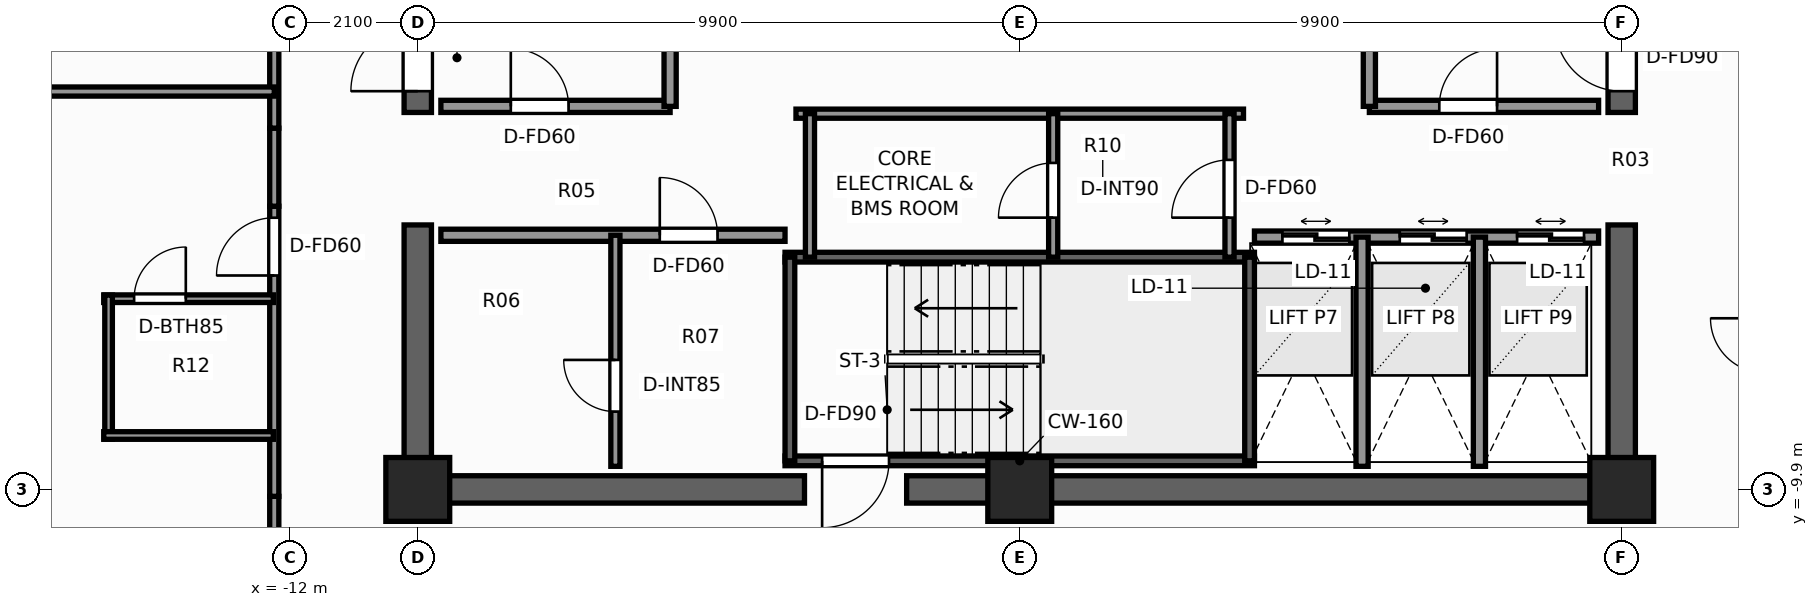
"""IFC4 building model, lengths in metres.
Left out: names, types, materials, properties, quantities, classifications, styles, units other than length and angle.
Written with IfcOpenShell. Run it as: python <this file> out.ifc"""

import sys

from ifc_helpers import new_model, si_unit, direction, frame, frame_2d, origin, origin_2d, place, context, subcontext, project, spatial, rectangle, extrude, element, fill, save


model = new_model("IFC4")
c1 = context("Model", 3, precision=1e-05, world=origin(), true_north=direction((0.0, 1.0)))
c2 = subcontext(c1, "Body", "Model", "MODEL_VIEW")
j1 = project(units=[si_unit("LENGTHUNIT", "METRE"), si_unit("PLANEANGLEUNIT", "RADIAN")], contexts=[c1])
p1 = place(None, origin())
s1 = spatial("IfcSite", under=j1, at=p1, CompositionType="ELEMENT")
p2 = place(p1, origin())
s2 = spatial("IfcBuilding", under=s1, at=p2, CompositionType="ELEMENT")
p3 = place(p2, frame((0.0, 0.0, 219.6)))
s3 = spatial("IfcBuildingStorey", under=s2, at=p3, CompositionType="ELEMENT", Elevation=219.6)
p4 = place(p3, frame((10.125, -9.9, 0.0), z_axis=(0.0, 0.0, 1.0), x_axis=(-1.0, 0.0, 0.0)))
e1 = element("IfcWall", 1, at=p4, inside=s3, PredefinedType="SHEAR", context=c2, shape_type="SweptSolid", body=[
    extrude(rectangle(XDim=11.985, YDim=0.45, at=frame_2d((5.993, 0.0))), origin(), (0.0, 0.0, 1.0), 3.3),
])
p5 = place(p3, frame((-3.54, -9.9, 0.0), z_axis=(0.0, 0.0, 1.0), x_axis=(-1.0, 0.0, 0.0)))
e2 = element("IfcWall", 2, at=p5, inside=s3, PredefinedType="SHEAR", context=c2, shape_type="SweptSolid", body=[
    extrude(rectangle(XDim=6.585, YDim=0.45, at=frame_2d((3.292, 0.0))), origin(), (0.0, 0.0, 1.0), 3.3),
])
for number, where, z_axis, x_axis in (
    (3, (-9.9, -9.675, 0.0), (0.0, 0.0, 1.0), (0.0, 1.0, 0.0)),
    (4, (9.9, -9.675, 0.0), (0.0, 0.0, 1.0), (0.0, 1.0, 0.0)),
):
    element("IfcWall", number, at=place(p3, frame(where, z_axis=z_axis, x_axis=x_axis)), inside=s3, PredefinedType="SHEAR", context=c2, shape_type="SweptSolid", body=[
        extrude(rectangle(XDim=4.125, YDim=0.45, at=frame_2d((2.062, 0.0))), origin(), (0.0, 0.0, 1.0), 3.3),
    ])
p6 = place(p3, frame((-9.9, -3.7, 0.0), z_axis=(0.0, 0.0, 1.0), x_axis=(0.0, 1.0, 0.0)))
e5 = element("IfcWall", 5, at=p6, inside=s3, PredefinedType="SHEAR", context=c2, shape_type="SweptSolid", body=[
    extrude(rectangle(XDim=13.375, YDim=0.45, at=frame_2d((6.688, 0.0))), origin(), (0.0, 0.0, 1.0), 3.3),
])
p7 = place(p6, frame((0.35, 0.0, 0.0)))
e6 = element("IfcOpeningElement", 6, at=p7, cuts=e5, PredefinedType="OPENING", context=c2, shape_type="SweptSolid", body=[
    extrude(rectangle(XDim=1.1, YDim=2.2, at=frame_2d((0.55, 1.1))), frame((0.0, 0.235, 0.0), z_axis=(0.0, -1.0, 0.0), x_axis=(1.0, 0.0, 0.0)), (0.0, 0.0, 1.0), 0.47),
])
p8 = place(p3, frame((9.9, -3.7, 0.0), z_axis=(0.0, 0.0, 1.0), x_axis=(0.0, 1.0, 0.0)))
e7 = element("IfcWall", 7, at=p8, inside=s3, PredefinedType="SHEAR", context=c2, shape_type="SweptSolid", body=[
    extrude(rectangle(XDim=13.375, YDim=0.45, at=frame_2d((6.688, 0.0))), origin(), (0.0, 0.0, 1.0), 3.3),
])
p9 = place(p8, frame((0.35, 0.0, 0.0)))
e8 = element("IfcOpeningElement", 8, at=p9, cuts=e7, PredefinedType="OPENING", context=c2, shape_type="SweptSolid", body=[
    extrude(rectangle(XDim=1.1, YDim=2.2, at=frame_2d((0.55, 1.1))), frame((0.0, 0.235, 0.0), z_axis=(0.0, -1.0, 0.0), x_axis=(1.0, 0.0, 0.0)), (0.0, 0.0, 1.0), 0.47),
])
for number, where, z_axis, x_axis in (
    (9, (-9.9, -9.9, 0.0), (0.0, 0.0, 1.0), (1.0, 0.0, 0.0)),
    (10, (9.9, -9.9, 0.0), (0.0, 0.0, 1.0), (1.0, 0.0, 0.0)),
    (11, (0.0, -9.9, 0.0), (0.0, 0.0, 1.0), (1.0, 0.0, 0.0)),
):
    element("IfcColumn", number, at=place(p3, frame(where, z_axis=z_axis, x_axis=x_axis)), inside=s3, PredefinedType="COLUMN", context=c2, shape_type="SweptSolid", body=[
        extrude(rectangle(XDim=1.05, YDim=1.05, at=origin_2d()), origin(), (0.0, 0.0, 1.0), 3.3),
    ])
p10 = place(p3, frame((3.86, -9.43, 0.0), z_axis=(0.0, 0.0, 1.0), x_axis=(-1.0, 0.0, 0.0)))
e12 = element("IfcWall", 12, at=p10, inside=s3, PredefinedType="SHEAR", context=c2, shape_type="SweptSolid", body=[
    extrude(rectangle(XDim=7.72, YDim=0.16, at=frame_2d((3.86, 0.0))), origin(), (0.0, 0.0, 1.0), 3.3),
])
p11 = place(p10, frame((6.01, 0.0, 0.0)))
e13 = element("IfcOpeningElement", 13, at=p11, cuts=e12, PredefinedType="OPENING", context=c2, shape_type="SweptSolid", body=[
    extrude(rectangle(XDim=1.1, YDim=2.2, at=frame_2d((0.55, 1.1))), frame((0.0, 0.09, 0.0), z_axis=(0.0, -1.0, 0.0), x_axis=(1.0, 0.0, 0.0)), (0.0, 0.0, 1.0), 0.18),
])
p12 = place(p3, frame((-3.86, -6.08, 0.0), z_axis=(0.0, 0.0, 1.0), x_axis=(1.0, 0.0, 0.0)))
e14 = element("IfcWall", 14, at=p12, inside=s3, PredefinedType="SHEAR", context=c2, shape_type="SweptSolid", body=[
    extrude(rectangle(XDim=7.72, YDim=0.16, at=frame_2d((3.86, 0.0))), origin(), (0.0, 0.0, 1.0), 3.3),
])
for number, where, z_axis, x_axis in (
    (15, (-3.78, -9.43, 0.0), (0.0, 0.0, 1.0), (0.0, 1.0, 0.0)),
    (16, (3.78, -9.43, 0.0), (0.0, 0.0, 1.0), (0.0, 1.0, 0.0)),
):
    element("IfcWall", number, at=place(p3, frame(where, z_axis=z_axis, x_axis=x_axis)), inside=s3, PredefinedType="SHEAR", context=c2, shape_type="SweptSolid", body=[
        extrude(rectangle(XDim=3.35, YDim=0.16, at=frame_2d((1.675, 0.0))), origin(), (0.0, 0.0, 1.0), 3.3),
    ])
p13 = place(p3, frame((-9.52, -3.6, 0.0), z_axis=(0.0, 0.0, 1.0), x_axis=(1.0, 0.0, 0.0)))
e17 = element("IfcWall", 17, at=p13, inside=s3, PredefinedType="SOLIDWALL", context=c2, shape_type="SweptSolid", body=[
    extrude(rectangle(XDim=3.77, YDim=0.2, at=frame_2d((1.885, 0.0))), origin(), (0.0, 0.0, 1.0), 3.08),
])
p14 = place(p13, frame((1.15, 0.0, 0.0)))
e18 = element("IfcOpeningElement", 18, at=p14, cuts=e17, PredefinedType="OPENING", context=c2, shape_type="SweptSolid", body=[
    extrude(rectangle(XDim=0.95, YDim=2.06, at=frame_2d((0.475, 1.03))), frame((0.0, 0.11, 0.0), z_axis=(0.0, -1.0, 0.0), x_axis=(1.0, 0.0, 0.0)), (0.0, 0.0, 1.0), 0.22),
])
p15 = place(p3, frame((-5.75, -3.6, 0.0), z_axis=(0.0, 0.0, 1.0), x_axis=(0.0, 1.0, 0.0)))
e19 = element("IfcWall", 19, at=p15, inside=s3, PredefinedType="SOLIDWALL", context=c2, shape_type="SweptSolid", body=[
    extrude(rectangle(XDim=5.57, YDim=0.2, at=frame_2d((2.785, 0.0))), origin(), (0.0, 0.0, 1.0), 3.08),
])
p16 = place(p15, frame((2.75, 0.0, 0.0)))
e20 = element("IfcOpeningElement", 20, at=p16, cuts=e19, PredefinedType="OPENING", context=c2, shape_type="SweptSolid", body=[
    extrude(rectangle(XDim=1.1, YDim=2.2, at=frame_2d((0.55, 1.1))), frame((0.0, 0.11, 0.0), z_axis=(0.0, -1.0, 0.0), x_axis=(1.0, 0.0, 0.0)), (0.0, 0.0, 1.0), 0.22),
])
p17 = place(p3, frame((5.75, -3.6, 0.0), z_axis=(0.0, 0.0, 1.0), x_axis=(1.0, 0.0, 0.0)))
e21 = element("IfcWall", 21, at=p17, inside=s3, PredefinedType="SOLIDWALL", context=c2, shape_type="SweptSolid", body=[
    extrude(rectangle(XDim=3.77, YDim=0.2, at=frame_2d((1.885, 0.0))), origin(), (0.0, 0.0, 1.0), 3.08),
])
p18 = place(p17, frame((1.15, 0.0, 0.0)))
e22 = element("IfcOpeningElement", 22, at=p18, cuts=e21, PredefinedType="OPENING", context=c2, shape_type="SweptSolid", body=[
    extrude(rectangle(XDim=0.95, YDim=2.06, at=frame_2d((0.475, 1.03))), frame((0.0, 0.11, 0.0), z_axis=(0.0, -1.0, 0.0), x_axis=(1.0, 0.0, 0.0)), (0.0, 0.0, 1.0), 0.22),
])
p19 = place(p3, frame((5.75, -3.6, 0.0), z_axis=(0.0, 0.0, 1.0), x_axis=(0.0, 1.0, 0.0)))
e23 = element("IfcWall", 23, at=p19, inside=s3, PredefinedType="SOLIDWALL", context=c2, shape_type="SweptSolid", body=[
    extrude(rectangle(XDim=5.57, YDim=0.2, at=frame_2d((2.785, 0.0))), origin(), (0.0, 0.0, 1.0), 3.08),
])
p20 = place(p19, frame((2.75, 0.0, 0.0)))
e24 = element("IfcOpeningElement", 24, at=p20, cuts=e23, PredefinedType="OPENING", context=c2, shape_type="SweptSolid", body=[
    extrude(rectangle(XDim=1.1, YDim=2.2, at=frame_2d((0.55, 1.1))), frame((0.0, 0.11, 0.0), z_axis=(0.0, -1.0, 0.0), x_axis=(1.0, 0.0, 0.0)), (0.0, 0.0, 1.0), 0.22),
])
p21 = place(p3, frame((-9.52, -5.72, 0.0), z_axis=(0.0, 0.0, 1.0), x_axis=(1.0, 0.0, 0.0)))
e25 = element("IfcWall", 25, at=p21, inside=s3, PredefinedType="SOLIDWALL", context=c2, shape_type="SweptSolid", body=[
    extrude(rectangle(XDim=5.66, YDim=0.2, at=frame_2d((2.83, 0.0))), origin(), (0.0, 0.0, 1.0), 3.08),
])
p22 = place(p21, frame((3.6, 0.0, 0.0)))
e26 = element("IfcOpeningElement", 26, at=p22, cuts=e25, PredefinedType="OPENING", context=c2, shape_type="SweptSolid", body=[
    extrude(rectangle(XDim=0.95, YDim=2.06, at=frame_2d((0.475, 1.03))), frame((0.0, 0.11, 0.0), z_axis=(0.0, -1.0, 0.0), x_axis=(1.0, 0.0, 0.0)), (0.0, 0.0, 1.0), 0.22),
])
p23 = place(p3, frame((-6.65, -9.52, 0.0), z_axis=(0.0, 0.0, 1.0), x_axis=(0.0, 1.0, 0.0)))
e27 = element("IfcWall", 27, at=p23, inside=s3, PredefinedType="PARTITIONING", context=c2, shape_type="SweptSolid", body=[
    extrude(rectangle(XDim=3.8, YDim=0.15, at=frame_2d((1.9, 0.0))), origin(), (0.0, 0.0, 1.0), 3.08),
])
p24 = place(p23, frame((0.9, 0.0, 0.0)))
e28 = element("IfcOpeningElement", 28, at=p24, cuts=e27, PredefinedType="OPENING", context=c2, shape_type="SweptSolid", body=[
    extrude(rectangle(XDim=0.85, YDim=2.03, at=frame_2d((0.425, 1.015))), frame((0.0, 0.085, 0.0), z_axis=(0.0, -1.0, 0.0), x_axis=(1.0, 0.0, 0.0)), (0.0, 0.0, 1.0), 0.17),
])
p25 = place(p3, frame((3.86, -5.75, 0.0), z_axis=(0.0, 0.0, 1.0), x_axis=(1.0, 0.0, 0.0)))
e29 = element("IfcWall", 29, at=p25, inside=s3, PredefinedType="SOLIDWALL", context=c2, shape_type="SweptSolid", body=[
    extrude(rectangle(XDim=5.66, YDim=0.2, at=frame_2d((2.83, 0.0))), origin(), (0.0, 0.0, 1.0), 3.08),
])
p26 = place(p25, frame((0.46, 0.0, 0.0)))
e30 = element("IfcOpeningElement", 30, at=p26, cuts=e29, PredefinedType="OPENING", context=c2, shape_type="SweptSolid", body=[
    extrude(rectangle(XDim=1.1, YDim=2.2, at=frame_2d((0.55, 1.1))), frame((0.0, 0.11, 0.0), z_axis=(0.0, -1.0, 0.0), x_axis=(1.0, 0.0, 0.0)), (0.0, 0.0, 1.0), 0.22),
])
p27 = place(p25, frame((2.39, 0.0, 0.0)))
e31 = element("IfcOpeningElement", 31, at=p27, cuts=e29, PredefinedType="OPENING", context=c2, shape_type="SweptSolid", body=[
    extrude(rectangle(XDim=1.1, YDim=2.2, at=frame_2d((0.55, 1.1))), frame((0.0, 0.11, 0.0), z_axis=(0.0, -1.0, 0.0), x_axis=(1.0, 0.0, 0.0)), (0.0, 0.0, 1.0), 0.22),
])
p28 = place(p25, frame((4.32, 0.0, 0.0)))
e32 = element("IfcOpeningElement", 32, at=p28, cuts=e29, PredefinedType="OPENING", context=c2, shape_type="SweptSolid", body=[
    extrude(rectangle(XDim=1.1, YDim=2.2, at=frame_2d((0.55, 1.1))), frame((0.0, 0.11, 0.0), z_axis=(0.0, -1.0, 0.0), x_axis=(1.0, 0.0, 0.0)), (0.0, 0.0, 1.0), 0.22),
])
for number, where, z_axis, x_axis in (
    (33, (5.63, -9.52, 0.0), (0.0, 0.0, 1.0), (0.0, 1.0, 0.0)),
    (34, (7.56, -9.52, 0.0), (0.0, 0.0, 1.0), (0.0, 1.0, 0.0)),
):
    element("IfcWall", number, at=place(p3, frame(where, z_axis=z_axis, x_axis=x_axis)), inside=s3, PredefinedType="SOLIDWALL", context=c2, shape_type="SweptSolid", body=[
        extrude(rectangle(XDim=3.77, YDim=0.2, at=frame_2d((1.885, 0.0))), origin(), (0.0, 0.0, 1.0), 3.08),
    ])
p29 = place(p3, frame((-3.68, -3.72, 0.0), z_axis=(0.0, 0.0, 1.0), x_axis=(1.0, 0.0, 0.0)))
e35 = element("IfcWall", 35, at=p29, inside=s3, PredefinedType="PARTITIONING", context=c2, shape_type="SweptSolid", body=[
    extrude(rectangle(XDim=7.36, YDim=0.15, at=frame_2d((3.68, 0.0))), origin(), (0.0, 0.0, 1.0), 3.08),
])
p30 = place(p3, frame((3.45, -6.08, 0.0), z_axis=(0.0, 0.0, 1.0), x_axis=(0.0, 1.0, 0.0)))
e36 = element("IfcWall", 36, at=p30, inside=s3, PredefinedType="PARTITIONING", context=c2, shape_type="SweptSolid", body=[
    extrude(rectangle(XDim=2.36, YDim=0.15, at=frame_2d((1.18, 0.0))), origin(), (0.0, 0.0, 1.0), 3.08),
])
p31 = place(p30, frame((0.65, 0.0, 0.0)))
e37 = element("IfcOpeningElement", 37, at=p31, cuts=e36, PredefinedType="OPENING", context=c2, shape_type="SweptSolid", body=[
    extrude(rectangle(XDim=0.95, YDim=2.06, at=frame_2d((0.475, 1.03))), frame((0.0, 0.085, 0.0), z_axis=(0.0, -1.0, 0.0), x_axis=(1.0, 0.0, 0.0)), (0.0, 0.0, 1.0), 0.17),
])
p32 = place(p3, frame((-3.45, -6.08, 0.0), z_axis=(0.0, 0.0, 1.0), x_axis=(0.0, 1.0, 0.0)))
e38 = element("IfcWall", 38, at=p32, inside=s3, PredefinedType="PARTITIONING", context=c2, shape_type="SweptSolid", body=[
    extrude(rectangle(XDim=2.36, YDim=0.15, at=frame_2d((1.18, 0.0))), origin(), (0.0, 0.0, 1.0), 3.08),
])
p33 = place(p3, frame((0.55, -6.08, 0.0), z_axis=(0.0, 0.0, 1.0), x_axis=(0.0, 1.0, 0.0)))
e39 = element("IfcWall", 39, at=p33, inside=s3, PredefinedType="PARTITIONING", context=c2, shape_type="SweptSolid", body=[
    extrude(rectangle(XDim=2.36, YDim=0.15, at=frame_2d((1.18, 0.0))), origin(), (0.0, 0.0, 1.0), 3.08),
])
p34 = place(p33, frame((0.65, 0.0, 0.0)))
e40 = element("IfcOpeningElement", 40, at=p34, cuts=e39, PredefinedType="OPENING", context=c2, shape_type="SweptSolid", body=[
    extrude(rectangle(XDim=0.9, YDim=2.06, at=frame_2d((0.45, 1.03))), frame((0.0, 0.085, 0.0), z_axis=(0.0, -1.0, 0.0), x_axis=(1.0, 0.0, 0.0)), (0.0, 0.0, 1.0), 0.17),
])
p35 = place(p3, frame((-12.26, -11.43, 0.0), z_axis=(0.0, 0.0, 1.0), x_axis=(0.0, 1.0, 0.0)))
e41 = element("IfcWall", 41, at=p35, inside=s3, PredefinedType="PARTITIONING", context=c2, shape_type="SweptSolid", body=[
    extrude(rectangle(XDim=1.417, YDim=0.15, at=frame_2d((0.708, 0.0))), origin(), (0.0, 0.0, 1.0), 1.265),
])
p36 = place(p3, frame((-12.26, -10.014, 0.0), z_axis=(0.0, 0.0, 1.0), x_axis=(0.0, 1.0, 0.0)))
e42 = element("IfcWall", 42, at=p36, inside=s3, PredefinedType="PARTITIONING", context=c2, shape_type="SweptSolid", body=[
    extrude(rectangle(XDim=4.772, YDim=0.15, at=frame_2d((2.386, 0.0))), origin(), (0.0, 0.0, 1.0), 3.08),
])
p37 = place(p36, frame((3.632, 0.0, 0.0)))
e43 = element("IfcOpeningElement", 43, at=p37, cuts=e42, PredefinedType="OPENING", context=c2, shape_type="SweptSolid", body=[
    extrude(rectangle(XDim=0.95, YDim=2.06, at=frame_2d((0.475, 1.03))), frame((0.0, 0.085, 0.0), z_axis=(0.0, -1.0, 0.0), x_axis=(1.0, 0.0, 0.0)), (0.0, 0.0, 1.0), 0.17),
])
p38 = place(p3, frame((-12.26, -5.242, 0.0), z_axis=(0.0, 0.0, 1.0), x_axis=(0.0, 1.0, 0.0)))
e44 = element("IfcWall", 44, at=p38, inside=s3, PredefinedType="PARTITIONING", context=c2, shape_type="SweptSolid", body=[
    extrude(rectangle(XDim=1.284, YDim=0.15, at=frame_2d((0.642, 0.0))), origin(), (0.0, 0.0, 1.0), 1.265),
])
p39 = place(p3, frame((-12.26, -3.958, 0.0), z_axis=(0.0, 0.0, 1.0), x_axis=(0.0, 1.0, 0.0)))
e45 = element("IfcWall", 45, at=p39, inside=s3, PredefinedType="PARTITIONING", context=c2, shape_type="SweptSolid", body=[
    extrude(rectangle(XDim=7.916, YDim=0.15, at=frame_2d((3.958, 0.0))), origin(), (0.0, 0.0, 1.0), 2.369),
])
p40 = place(p3, frame((-20.38, -3.356, 0.0), z_axis=(0.0, 0.0, 1.0), x_axis=(1.0, 0.0, 0.0)))
e46 = element("IfcWall", 46, at=p40, inside=s3, PredefinedType="PARTITIONING", context=c2, shape_type="SweptSolid", body=[
    extrude(rectangle(XDim=8.12, YDim=0.15, at=frame_2d((4.06, 0.0))), origin(), (0.0, 0.0, 1.0), 2.369),
])
p41 = place(p3, frame((-15.065, -6.763, 0.0), z_axis=(0.0, 0.0, 1.0), x_axis=(1.0, 0.0, 0.0)))
e47 = element("IfcWall", 47, at=p41, inside=s3, PredefinedType="PARTITIONING", context=c2, shape_type="SweptSolid", body=[
    extrude(rectangle(XDim=2.79, YDim=0.125, at=frame_2d((1.395, 0.0))), origin(), (0.0, 0.0, 1.0), 3.08),
])
p42 = place(p41, frame((0.5, 0.0, 0.0)))
e48 = element("IfcOpeningElement", 48, at=p42, cuts=e47, PredefinedType="OPENING", context=c2, shape_type="SweptSolid", body=[
    extrude(rectangle(XDim=0.85, YDim=2.03, at=frame_2d((0.425, 1.015))), frame((0.0, 0.073, 0.0), z_axis=(0.0, -1.0, 0.0), x_axis=(1.0, 0.0, 0.0)), (0.0, 0.0, 1.0), 0.145),
])
p43 = place(p3, frame((-14.985, -9.073, 0.0), z_axis=(0.0, 0.0, 1.0), x_axis=(0.0, 1.0, 0.0)))
e49 = element("IfcWall", 49, at=p43, inside=s3, PredefinedType="PARTITIONING", context=c2, shape_type="SweptSolid", body=[
    extrude(rectangle(XDim=2.37, YDim=0.125, at=frame_2d((1.185, 0.0))), origin(), (0.0, 0.0, 1.0), 3.08),
])
p44 = place(p3, frame((-15.065, -9.013, 0.0), z_axis=(0.0, 0.0, 1.0), x_axis=(1.0, 0.0, 0.0)))
e50 = element("IfcWall", 50, at=p44, inside=s3, PredefinedType="PARTITIONING", context=c2, shape_type="SweptSolid", body=[
    extrude(rectangle(XDim=2.79, YDim=0.125, at=frame_2d((1.395, 0.0))), origin(), (0.0, 0.0, 1.0), 3.08),
])
p45 = place(p11, origin())
e51 = element("IfcDoor", 51, at=p45, inside=s3, OperationType="SINGLE_SWING_RIGHT", PredefinedType="DOOR", context=c2, shape_type="SweptSolid", body=[
    extrude(rectangle(XDim=1.1, YDim=2.2, at=frame_2d((0.55, 1.1))), frame((0.0, 0.025, 0.0), z_axis=(0.0, -1.0, 0.0), x_axis=(1.0, 0.0, 0.0)), (0.0, 0.0, 1.0), 0.05),
])
fill(e13, e51)
p46 = place(p7, origin())
e52 = element("IfcDoor", 52, at=p46, inside=s3, OperationType="SINGLE_SWING_LEFT", PredefinedType="DOOR", context=c2, shape_type="SweptSolid", body=[
    extrude(rectangle(XDim=1.1, YDim=2.2, at=frame_2d((0.55, 1.1))), frame((0.0, 0.025, 0.0), z_axis=(0.0, -1.0, 0.0), x_axis=(1.0, 0.0, 0.0)), (0.0, 0.0, 1.0), 0.05),
])
fill(e6, e52)
p47 = place(p9, origin())
e53 = element("IfcDoor", 53, at=p47, inside=s3, OperationType="SINGLE_SWING_RIGHT", PredefinedType="DOOR", context=c2, shape_type="SweptSolid", body=[
    extrude(rectangle(XDim=1.1, YDim=2.2, at=frame_2d((0.55, 1.1))), frame((0.0, 0.025, 0.0), z_axis=(0.0, -1.0, 0.0), x_axis=(1.0, 0.0, 0.0)), (0.0, 0.0, 1.0), 0.05),
])
fill(e8, e53)
p48 = place(p22, origin())
e54 = element("IfcDoor", 54, at=p48, inside=s3, OperationType="SINGLE_SWING_LEFT", PredefinedType="DOOR", context=c2, shape_type="SweptSolid", body=[
    extrude(rectangle(XDim=0.95, YDim=2.06, at=frame_2d((0.475, 1.03))), frame((0.0, 0.025, 0.0), z_axis=(0.0, -1.0, 0.0), x_axis=(1.0, 0.0, 0.0)), (0.0, 0.0, 1.0), 0.05),
])
fill(e26, e54)
p49 = place(p24, origin())
e55 = element("IfcDoor", 55, at=p49, inside=s3, OperationType="SINGLE_SWING_RIGHT", PredefinedType="DOOR", context=c2, shape_type="SweptSolid", body=[
    extrude(rectangle(XDim=0.85, YDim=2.03, at=frame_2d((0.425, 1.015))), frame((0.0, 0.025, 0.0), z_axis=(0.0, -1.0, 0.0), x_axis=(1.0, 0.0, 0.0)), (0.0, 0.0, 1.0), 0.05),
])
fill(e28, e55)
p50 = place(p14, origin())
e56 = element("IfcDoor", 56, at=p50, inside=s3, OperationType="SINGLE_SWING_LEFT", PredefinedType="DOOR", context=c2, shape_type="SweptSolid", body=[
    extrude(rectangle(XDim=0.95, YDim=2.06, at=frame_2d((0.475, 1.03))), frame((0.0, 0.025, 0.0), z_axis=(0.0, -1.0, 0.0), x_axis=(1.0, 0.0, 0.0)), (0.0, 0.0, 1.0), 0.05),
])
fill(e18, e56)
p51 = place(p26, origin())
e57 = element("IfcDoor", 57, at=p51, inside=s3, OperationType="DOUBLE_DOOR_SLIDING", PredefinedType="DOOR", context=c2, shape_type="SweptSolid", body=[
    extrude(rectangle(XDim=1.1, YDim=2.2, at=frame_2d((0.55, 1.1))), frame((0.0, 0.025, 0.0), z_axis=(0.0, -1.0, 0.0), x_axis=(1.0, 0.0, 0.0)), (0.0, 0.0, 1.0), 0.05),
])
fill(e30, e57)
p52 = place(p27, origin())
e58 = element("IfcDoor", 58, at=p52, inside=s3, OperationType="DOUBLE_DOOR_SLIDING", PredefinedType="DOOR", context=c2, shape_type="SweptSolid", body=[
    extrude(rectangle(XDim=1.1, YDim=2.2, at=frame_2d((0.55, 1.1))), frame((0.0, 0.025, 0.0), z_axis=(0.0, -1.0, 0.0), x_axis=(1.0, 0.0, 0.0)), (0.0, 0.0, 1.0), 0.05),
])
fill(e31, e58)
p53 = place(p28, origin())
e59 = element("IfcDoor", 59, at=p53, inside=s3, OperationType="DOUBLE_DOOR_SLIDING", PredefinedType="DOOR", context=c2, shape_type="SweptSolid", body=[
    extrude(rectangle(XDim=1.1, YDim=2.2, at=frame_2d((0.55, 1.1))), frame((0.0, 0.025, 0.0), z_axis=(0.0, -1.0, 0.0), x_axis=(1.0, 0.0, 0.0)), (0.0, 0.0, 1.0), 0.05),
])
fill(e32, e59)
p54 = place(p18, origin())
e60 = element("IfcDoor", 60, at=p54, inside=s3, OperationType="SINGLE_SWING_RIGHT", PredefinedType="DOOR", context=c2, shape_type="SweptSolid", body=[
    extrude(rectangle(XDim=0.95, YDim=2.06, at=frame_2d((0.475, 1.03))), frame((0.0, 0.025, 0.0), z_axis=(0.0, -1.0, 0.0), x_axis=(1.0, 0.0, 0.0)), (0.0, 0.0, 1.0), 0.05),
])
fill(e22, e60)
p55 = place(p31, origin())
e61 = element("IfcDoor", 61, at=p55, inside=s3, OperationType="SINGLE_SWING_LEFT", PredefinedType="DOOR", context=c2, shape_type="SweptSolid", body=[
    extrude(rectangle(XDim=0.95, YDim=2.06, at=frame_2d((0.475, 1.03))), frame((0.0, 0.025, 0.0), z_axis=(0.0, -1.0, 0.0), x_axis=(1.0, 0.0, 0.0)), (0.0, 0.0, 1.0), 0.05),
])
fill(e37, e61)
p56 = place(p34, origin())
e62 = element("IfcDoor", 62, at=p56, inside=s3, OperationType="SINGLE_SWING_LEFT", PredefinedType="DOOR", context=c2, shape_type="SweptSolid", body=[
    extrude(rectangle(XDim=0.9, YDim=2.06, at=frame_2d((0.45, 1.03))), frame((0.0, 0.025, 0.0), z_axis=(0.0, -1.0, 0.0), x_axis=(1.0, 0.0, 0.0)), (0.0, 0.0, 1.0), 0.05),
])
fill(e40, e62)
p57 = place(p42, origin())
e63 = element("IfcDoor", 63, at=p57, inside=s3, OperationType="SINGLE_SWING_RIGHT", PredefinedType="DOOR", context=c2, shape_type="SweptSolid", body=[
    extrude(rectangle(XDim=0.85, YDim=2.03, at=frame_2d((0.425, 1.015))), frame((0.0, 0.025, 0.0), z_axis=(0.0, -1.0, 0.0), x_axis=(1.0, 0.0, 0.0)), (0.0, 0.0, 1.0), 0.05),
])
fill(e48, e63)
p58 = place(p37, origin())
e64 = element("IfcDoor", 64, at=p58, inside=s3, OperationType="SINGLE_SWING_LEFT", PredefinedType="DOOR", context=c2, shape_type="SweptSolid", body=[
    extrude(rectangle(XDim=0.95, YDim=2.06, at=frame_2d((0.475, 1.03))), frame((0.0, 0.025, 0.0), z_axis=(0.0, -1.0, 0.0), x_axis=(1.0, 0.0, 0.0)), (0.0, 0.0, 1.0), 0.05),
])
fill(e43, e64)
save(model, sys.argv[1])
